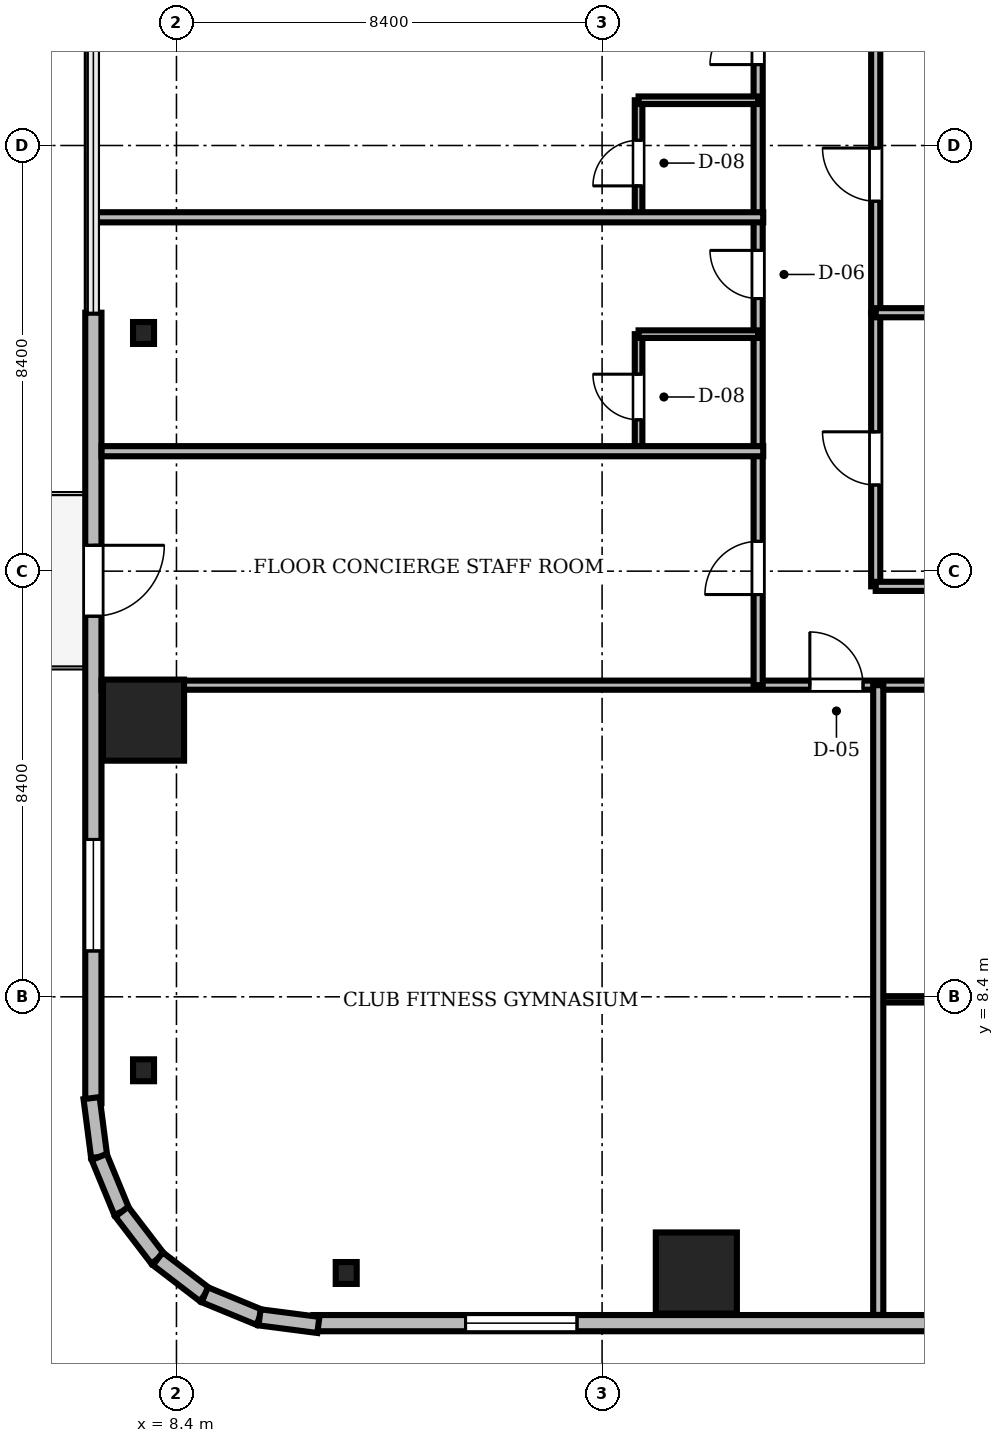
"""IFC4 building model, lengths in metres.
Left out: names, types, materials, properties, quantities, classifications, styles, units other than length and angle.
Written with IfcOpenShell. Run it as: python <this file> out.ifc"""

import sys

from ifc_helpers import new_model, si_unit, direction, frame, frame_2d, origin, origin_2d, place, context, subcontext, project, spatial, rectangle, i_section, extrude, source, transform, mapped, element, fill, save


model = new_model("IFC4")
c1 = context("Model", 3, precision=1e-05, world=origin(), true_north=direction((0.0, 1.0)))
c2 = subcontext(c1, "Body", "Model", "MODEL_VIEW")
j1 = project(units=[si_unit("LENGTHUNIT", "METRE"), si_unit("PLANEANGLEUNIT", "RADIAN")], contexts=[c1])
p1 = place(None, origin())
s1 = spatial("IfcSite", under=j1, at=p1, CompositionType="ELEMENT")
p2 = place(p1, origin())
s2 = spatial("IfcBuilding", under=s1, at=p2, CompositionType="ELEMENT")
p3 = place(p2, frame((0.0, 0.0, 144.6)))
s3 = spatial("IfcBuildingStorey", under=s2, at=p3, CompositionType="ELEMENT", Elevation=144.6)
m1 = source(origin(), c2, "Body", "SweptSolid", [
    extrude(rectangle(XDim=1.6, YDim=1.6, at=origin_2d()), origin(), (0.0, 0.0, 1.0), 3.46),
])
for number, where, z_axis, x_axis in (
    (1, (18.66, 2.95, 0.0), (0.0, 0.0, 1.0), (1.0, 0.0, 0.0)),
    (2, (7.75, 13.86, 0.0), (0.0, 0.0, 1.0), (1.0, 0.0, 0.0)),
):
    element("IfcColumn", number, at=place(p3, frame(where, z_axis=z_axis, x_axis=x_axis)), inside=s3, PredefinedType="COLUMN", context=c2, shape_type="MappedRepresentation", body=[
        mapped(m1, transform((0.0, 0.0, 0.0), scale=1.0)),
    ])
m2 = source(origin(), c2, "Body", "SweptSolid", [
    extrude(i_section(OverallWidth=0.414, OverallDepth=0.432, WebThickness=0.026, FlangeThickness=0.04, FilletRadius=0.015, at=origin_2d()), origin(), (0.0, 0.0, 1.0), 3.46),
])
for number, where, z_axis, x_axis in (
    (3, (11.75, 2.95, 0.0), (0.0, 0.0, 1.0), (1.0, 0.0, 0.0)),
    (4, (7.75, 21.5, 0.0), (0.0, 0.0, 1.0), (1.0, 0.0, 0.0)),
    (5, (7.75, 6.95, 0.0), (0.0, 0.0, 1.0), (1.0, 0.0, 0.0)),
):
    element("IfcColumn", number, at=place(p3, frame(where, z_axis=z_axis, x_axis=x_axis)), inside=s3, PredefinedType="COLUMN", context=c2, shape_type="MappedRepresentation", body=[
        mapped(m2, transform((0.0, 0.0, 0.0), scale=1.0)),
    ])
m3 = source(origin(), c2, "Body", "SweptSolid", [
    extrude(rectangle(XDim=15.6, YDim=0.32, at=frame_2d((7.8, 0.0))), origin(), (0.0, 0.0, 1.0), 3.46),
])
p4 = place(p3, frame((11.1, 1.96, 0.0), z_axis=(0.0, 0.0, 1.0), x_axis=(1.0, 0.0, 0.0)))
e6 = element("IfcWall", 6, at=p4, inside=s3, PredefinedType="SOLIDWALL", context=c2, shape_type="MappedRepresentation", body=[
    mapped(m3, transform((0.0, 0.0, 0.0), scale=1.0)),
])
m4 = source(origin(), c2, "Body", "SweptSolid", [
    extrude(rectangle(XDim=2.2, YDim=2.4, at=frame_2d((1.1, 1.2))), frame((0.0, 0.17, 0.0), z_axis=(0.0, -1.0, 0.0), x_axis=(1.0, 0.0, 0.0)), (0.0, 0.0, 1.0), 0.34),
])
p5 = place(p4, frame((3.005, 0.0, 0.72)))
e7 = element("IfcOpeningElement", 7, at=p5, cuts=e6, PredefinedType="OPENING", context=c2, shape_type="MappedRepresentation", body=[
    mapped(m4, transform((0.0, 0.0, 0.0), scale=1.0)),
])
p6 = place(p3, frame((6.76, 21.9, 0.0), z_axis=(0.0, 0.0, 1.0), x_axis=(0.0, -1.0, 0.0)))
e8 = element("IfcWall", 8, at=p6, inside=s3, PredefinedType="SOLIDWALL", context=c2, shape_type="MappedRepresentation", body=[
    mapped(m3, transform((0.0, 0.0, 0.0), scale=1.0)),
])
m5 = source(origin(), c2, "Body", "SweptSolid", [
    extrude(rectangle(XDim=1.4, YDim=2.3, at=frame_2d((0.7, 1.15))), frame((0.0, 0.17, 0.0), z_axis=(0.0, -1.0, 0.0), x_axis=(1.0, 0.0, 0.0)), (0.0, 0.0, 1.0), 0.34),
])
p7 = place(p6, frame((4.59, 0.0, 0.0)))
e9 = element("IfcOpeningElement", 9, at=p7, cuts=e8, PredefinedType="OPENING", context=c2, shape_type="MappedRepresentation", body=[
    mapped(m5, transform((0.0, 0.0, 0.0), scale=1.0)),
])
p8 = place(p6, frame((10.395, 0.0, 0.72)))
e10 = element("IfcOpeningElement", 10, at=p8, cuts=e8, PredefinedType="OPENING", context=c2, shape_type="MappedRepresentation", body=[
    mapped(m4, transform((0.0, 0.0, 0.0), scale=1.0)),
])
m6 = source(origin(), c2, "Body", "SweptSolid", [
    extrude(rectangle(XDim=1.171, YDim=0.32, at=frame_2d((0.585, 0.0))), origin(), (0.0, 0.0, 1.0), 3.46),
])
p9 = place(p3, frame((6.724, 6.401, 0.0), z_axis=(0.0, 0.0, 1.0), x_axis=(0.128269133229, -0.991739395941, 0.0)))
e11 = element("IfcWall", 11, at=p9, inside=s3, PredefinedType="SOLIDWALL", context=c2, shape_type="MappedRepresentation", body=[
    mapped(m6, transform((0.0, 0.0, 0.0), scale=1.0)),
])
m7 = source(origin(), c2, "Body", "SweptSolid", [
    extrude(rectangle(XDim=1.169, YDim=0.32, at=frame_2d((0.584, 0.0))), origin(), (0.0, 0.0, 1.0), 3.46),
])
for number, where, z_axis, x_axis in (
    (12, (6.875, 5.24, 0.0), (0.0, 0.0, 1.0), (0.381, -0.925, 0.0)),
    (13, (7.32, 4.159, 0.0), (0.0, 0.0, 1.0), (0.608, -0.794, 0.0)),
):
    element("IfcWall", number, at=place(p3, frame(where, z_axis=z_axis, x_axis=x_axis)), inside=s3, PredefinedType="SOLIDWALL", context=c2, shape_type="MappedRepresentation", body=[
        mapped(m7, transform((0.0, 0.0, 0.0), scale=1.0)),
    ])
m8 = source(origin(), c2, "Body", "SweptSolid", [
    extrude(rectangle(XDim=1.169, YDim=0.32, at=frame_2d((0.584, 0.0))), origin(), (0.0, 0.0, 1.0), 3.46),
])
p10 = place(p3, frame((8.031, 3.231, 0.0), z_axis=(0.0, 0.0, 1.0), x_axis=(0.793663520347, -0.608356981114, 0.0)))
e14 = element("IfcWall", 14, at=p10, inside=s3, PredefinedType="SOLIDWALL", context=c2, shape_type="MappedRepresentation", body=[
    mapped(m8, transform((0.0, 0.0, 0.0), scale=1.0)),
])
m9 = source(origin(), c2, "Body", "SweptSolid", [
    extrude(rectangle(XDim=1.169, YDim=0.32, at=frame_2d((0.585, 0.0))), origin(), (0.0, 0.0, 1.0), 3.46),
])
p11 = place(p3, frame((8.959, 2.52, 0.0), z_axis=(0.0, 0.0, 1.0), x_axis=(0.924479075121, -0.381232789334, 0.0)))
e15 = element("IfcWall", 15, at=p11, inside=s3, PredefinedType="SOLIDWALL", context=c2, shape_type="MappedRepresentation", body=[
    mapped(m9, transform((0.0, 0.0, 0.0), scale=1.0)),
])
m10 = source(origin(), c2, "Body", "SweptSolid", [
    extrude(rectangle(XDim=1.17, YDim=0.32, at=frame_2d((0.585, 0.0))), origin(), (0.0, 0.0, 1.0), 3.46),
])
p12 = place(p3, frame((10.04, 2.074, 0.0), z_axis=(0.0, 0.0, 1.0), x_axis=(0.991762485493, -0.128090485085, 0.0)))
e16 = element("IfcWall", 16, at=p12, inside=s3, PredefinedType="SOLIDWALL", context=c2, shape_type="MappedRepresentation", body=[
    mapped(m10, transform((0.0, 0.0, 0.0), scale=1.0)),
])
m11 = source(origin(), c2, "Body", "SweptSolid", [
    extrude(rectangle(XDim=46.156, YDim=0.18, at=frame_2d((23.078, 0.0))), origin(), (0.0, 0.0, 1.0), 2.702),
])
p13 = place(p3, frame((6.922, 14.55, 0.0), z_axis=(0.0, 0.0, 1.0), x_axis=(1.0, 0.0, 0.0)))
e17 = element("IfcWall", 17, at=p13, inside=s3, PredefinedType="PARTITIONING", context=c2, shape_type="MappedRepresentation", body=[
    mapped(m11, transform((0.0, 0.0, 0.0), scale=1.0)),
])
m12 = source(origin(), c2, "Body", "SweptSolid", [
    extrude(rectangle(XDim=1.05, YDim=2.2, at=frame_2d((0.525, 1.1))), frame((0.0, 0.1, 0.0), z_axis=(0.0, -1.0, 0.0), x_axis=(1.0, 0.0, 0.0)), (0.0, 0.0, 1.0), 0.2),
])
p14 = place(p13, frame((13.978, 0.0, 0.0)))
e18 = element("IfcOpeningElement", 18, at=p14, cuts=e17, PredefinedType="OPENING", context=c2, shape_type="MappedRepresentation", body=[
    mapped(m12, transform((0.0, 0.0, 0.0), scale=1.0)),
])
p15 = place(p13, frame((17.698, 0.0, 0.0)))
e19 = element("IfcOpeningElement", 19, at=p15, cuts=e17, PredefinedType="OPENING", context=c2, shape_type="MappedRepresentation", body=[
    mapped(m12, transform((0.0, 0.0, 0.0), scale=1.0)),
])
p16 = place(p13, frame((23.477, 0.0, 0.0)))
e20 = element("IfcOpeningElement", 20, at=p16, cuts=e17, PredefinedType="OPENING", context=c2, shape_type="MappedRepresentation", body=[
    mapped(m12, transform((0.0, 0.0, 0.0), scale=1.0)),
])
p17 = place(p13, frame((29.357, 0.0, 0.0)))
e21 = element("IfcOpeningElement", 21, at=p17, cuts=e17, PredefinedType="OPENING", context=c2, shape_type="MappedRepresentation", body=[
    mapped(m12, transform((0.0, 0.0, 0.0), scale=1.0)),
])
p18 = place(p13, frame((35.136, 0.0, 0.0)))
e22 = element("IfcOpeningElement", 22, at=p18, cuts=e17, PredefinedType="OPENING", context=c2, shape_type="MappedRepresentation", body=[
    mapped(m12, transform((0.0, 0.0, 0.0), scale=1.0)),
])
p19 = place(p13, frame((41.766, 0.0, 0.0)))
e23 = element("IfcOpeningElement", 23, at=p19, cuts=e17, PredefinedType="OPENING", context=c2, shape_type="MappedRepresentation", body=[
    mapped(m12, transform((0.0, 0.0, 0.0), scale=1.0)),
])
m13 = source(origin(), c2, "Body", "SweptSolid", [
    extrude(rectangle(XDim=14.0, YDim=0.18, at=frame_2d((7.0, 0.0))), origin(), (0.0, 0.0, 1.0), 2.852),
])
p20 = place(p3, frame((19.88, 14.55, 0.0), z_axis=(0.0, 0.0, 1.0), x_axis=(0.0, 1.0, 0.0)))
e24 = element("IfcWall", 24, at=p20, inside=s3, PredefinedType="PARTITIONING", context=c2, shape_type="MappedRepresentation", body=[
    mapped(m13, transform((0.0, 0.0, 0.0), scale=1.0)),
])
p21 = place(p20, frame((1.788, 0.0, 0.0)))
e25 = element("IfcOpeningElement", 25, at=p21, cuts=e24, PredefinedType="OPENING", context=c2, shape_type="MappedRepresentation", body=[
    mapped(m12, transform((0.0, 0.0, 0.0), scale=1.0)),
])
m14 = source(origin(), c2, "Body", "SweptSolid", [
    extrude(rectangle(XDim=0.95, YDim=2.15, at=frame_2d((0.475, 1.075))), frame((0.0, 0.1, 0.0), z_axis=(0.0, -1.0, 0.0), x_axis=(1.0, 0.0, 0.0)), (0.0, 0.0, 1.0), 0.2),
])
p22 = place(p20, frame((7.63, 0.0, 0.0)))
e26 = element("IfcOpeningElement", 26, at=p22, cuts=e24, PredefinedType="OPENING", context=c2, shape_type="MappedRepresentation", body=[
    mapped(m14, transform((0.0, 0.0, 0.0), scale=1.0)),
])
p23 = place(p20, frame((12.247, 0.0, 0.0)))
e27 = element("IfcOpeningElement", 27, at=p23, cuts=e24, PredefinedType="OPENING", context=c2, shape_type="MappedRepresentation", body=[
    mapped(m14, transform((0.0, 0.0, 0.0), scale=1.0)),
])
m15 = source(origin(), c2, "Body", "SweptSolid", [
    extrude(rectangle(XDim=6.54, YDim=0.18, at=frame_2d((3.27, 0.0))), origin(), (0.0, 0.0, 1.0), 2.852),
])
p24 = place(p3, frame((22.2, 21.9, 0.0), z_axis=(0.0, 0.0, 1.0), x_axis=(0.0, 1.0, 0.0)))
e28 = element("IfcWall", 28, at=p24, inside=s3, PredefinedType="PARTITIONING", context=c2, shape_type="MappedRepresentation", body=[
    mapped(m15, transform((0.0, 0.0, 0.0), scale=1.0)),
])
p25 = place(p24, frame((2.2, 0.0, 0.0)))
e29 = element("IfcOpeningElement", 29, at=p25, cuts=e28, PredefinedType="OPENING", context=c2, shape_type="MappedRepresentation", body=[
    mapped(m12, transform((0.0, 0.0, 0.0), scale=1.0)),
])
m16 = source(origin(), c2, "Body", "SweptSolid", [
    extrude(rectangle(XDim=5.779, YDim=0.125, at=frame_2d((2.89, 0.0))), origin(), (0.0, 0.0, 1.0), 2.852),
])
p26 = place(p3, frame((22.25, 8.35, 0.0), z_axis=(0.0, 0.0, 1.0), x_axis=(1.0, 0.0, 0.0)))
e30 = element("IfcWall", 30, at=p26, inside=s3, PredefinedType="PARTITIONING", context=c2, shape_type="MappedRepresentation", body=[
    mapped(m16, transform((0.0, 0.0, 0.0), scale=1.0)),
])
m17 = source(origin(), c2, "Body", "SweptSolid", [
    extrude(rectangle(XDim=0.95, YDim=2.15, at=frame_2d((0.475, 1.075))), frame((0.0, 0.073, 0.0), z_axis=(0.0, -1.0, 0.0), x_axis=(1.0, 0.0, 0.0)), (0.0, 0.0, 1.0), 0.145),
])
p27 = place(p26, frame((2.41, 0.0, 0.0)))
e31 = element("IfcOpeningElement", 31, at=p27, cuts=e30, PredefinedType="OPENING", context=c2, shape_type="MappedRepresentation", body=[
    mapped(m17, transform((0.0, 0.0, 0.0), scale=1.0)),
])
m18 = source(origin(), c2, "Body", "SweptSolid", [
    extrude(rectangle(XDim=5.4, YDim=0.18, at=frame_2d((2.7, 0.0))), origin(), (0.0, 0.0, 1.0), 2.852),
])
p28 = place(p3, frame((22.2, 16.5, 0.0), z_axis=(0.0, 0.0, 1.0), x_axis=(0.0, 1.0, 0.0)))
e32 = element("IfcWall", 32, at=p28, inside=s3, PredefinedType="PARTITIONING", context=c2, shape_type="MappedRepresentation", body=[
    mapped(m18, transform((0.0, 0.0, 0.0), scale=1.0)),
])
p29 = place(p28, frame((2.0, 0.0, 0.0)))
e33 = element("IfcOpeningElement", 33, at=p29, cuts=e32, PredefinedType="OPENING", context=c2, shape_type="MappedRepresentation", body=[
    mapped(m12, transform((0.0, 0.0, 0.0), scale=1.0)),
])
m19 = source(origin(), c2, "Body", "SweptSolid", [
    extrude(rectangle(XDim=2.29, YDim=0.15, at=frame_2d((1.145, 0.0))), origin(), (0.0, 0.0, 1.0), 2.852),
])
p30 = place(p3, frame((17.52, 19.187, 0.0), z_axis=(0.0, 0.0, 1.0), x_axis=(0.0, 1.0, 0.0)))
e34 = element("IfcWall", 34, at=p30, inside=s3, PredefinedType="PARTITIONING", context=c2, shape_type="MappedRepresentation", body=[
    mapped(m19, transform((0.0, 0.0, 0.0), scale=1.0)),
])
m20 = source(origin(), c2, "Body", "SweptSolid", [
    extrude(rectangle(XDim=0.9, YDim=2.1, at=frame_2d((0.45, 1.05))), frame((0.0, 0.085, 0.0), z_axis=(0.0, -1.0, 0.0), x_axis=(1.0, 0.0, 0.0)), (0.0, 0.0, 1.0), 0.17),
])
p31 = place(p30, frame((0.6, 0.0, 0.0)))
e35 = element("IfcOpeningElement", 35, at=p31, cuts=e34, PredefinedType="OPENING", context=c2, shape_type="MappedRepresentation", body=[
    mapped(m20, transform((0.0, 0.0, 0.0), scale=1.0)),
])
m21 = source(origin(), c2, "Body", "SweptSolid", [
    extrude(rectangle(XDim=2.29, YDim=0.15, at=frame_2d((1.145, 0.0))), origin(), (0.0, 0.0, 1.0), 3.46),
])
p32 = place(p3, frame((17.52, 23.803, 0.0), z_axis=(0.0, 0.0, 1.0), x_axis=(0.0, 1.0, 0.0)))
e36 = element("IfcWall", 36, at=p32, inside=s3, PredefinedType="PARTITIONING", context=c2, shape_type="MappedRepresentation", body=[
    mapped(m21, transform((0.0, 0.0, 0.0), scale=1.0)),
])
p33 = place(p32, frame((0.6, 0.0, 0.0)))
e37 = element("IfcOpeningElement", 37, at=p33, cuts=e36, PredefinedType="OPENING", context=c2, shape_type="MappedRepresentation", body=[
    mapped(m20, transform((0.0, 0.0, 0.0), scale=1.0)),
])
m22 = source(origin(), c2, "Body", "SweptSolid", [
    extrude(rectangle(XDim=13.058, YDim=0.2, at=frame_2d((6.529, 0.0))), origin(), (0.0, 0.0, 1.0), 2.702),
])
p34 = place(p3, frame((6.922, 19.167, 0.0), z_axis=(0.0, 0.0, 1.0), x_axis=(1.0, 0.0, 0.0)))
e38 = element("IfcWall", 38, at=p34, inside=s3, PredefinedType="PARTITIONING", context=c2, shape_type="MappedRepresentation", body=[
    mapped(m22, transform((0.0, 0.0, 0.0), scale=1.0)),
])
m23 = source(origin(), c2, "Body", "SweptSolid", [
    extrude(rectangle(XDim=13.25, YDim=0.2, at=frame_2d((6.625, 0.0))), origin(), (0.0, 0.0, 1.0), 2.702),
])
p35 = place(p3, frame((6.73, 23.783, 0.0), z_axis=(0.0, 0.0, 1.0), x_axis=(1.0, 0.0, 0.0)))
e39 = element("IfcWall", 39, at=p35, inside=s3, PredefinedType="PARTITIONING", context=c2, shape_type="MappedRepresentation", body=[
    mapped(m23, transform((0.0, 0.0, 0.0), scale=1.0)),
])
m24 = source(origin(), c2, "Body", "SweptSolid", [
    extrude(rectangle(XDim=12.428, YDim=0.2, at=frame_2d((6.214, 0.0))), origin(), (0.0, 0.0, 1.0), 2.702),
])
p36 = place(p3, frame((22.25, 2.122, 0.0), z_axis=(0.0, 0.0, 1.0), x_axis=(0.0, 1.0, 0.0)))
e40 = element("IfcWall", 40, at=p36, inside=s3, PredefinedType="PARTITIONING", context=c2, shape_type="MappedRepresentation", body=[
    mapped(m24, transform((0.0, 0.0, 0.0), scale=1.0)),
])
m25 = source(origin(), c2, "Body", "SweptSolid", [
    extrude(rectangle(XDim=6.2, YDim=0.18, at=frame_2d((3.1, 0.0))), origin(), (0.0, 0.0, 1.0), 3.46),
])
for number, where, z_axis, x_axis in (
    (41, (22.2, 16.5, 0.0), (0.0, 0.0, 1.0), (1.0, 0.0, 0.0)),
    (42, (22.2, 21.9, 0.0), (0.0, 0.0, 1.0), (1.0, 0.0, 0.0)),
):
    element("IfcWall", number, at=place(p3, frame(where, z_axis=z_axis, x_axis=x_axis)), inside=s3, PredefinedType="PARTITIONING", context=c2, shape_type="MappedRepresentation", body=[
        mapped(m25, transform((0.0, 0.0, 0.0), scale=1.0)),
    ])
m26 = source(origin(), c2, "Body", "SweptSolid", [
    extrude(rectangle(XDim=2.36, YDim=0.15, at=frame_2d((1.18, 0.0))), origin(), (0.0, 0.0, 1.0), 3.46),
])
for number, where, z_axis, x_axis in (
    (43, (17.52, 21.477, 0.0), (0.0, 0.0, 1.0), (1.0, 0.0, 0.0)),
    (44, (17.52, 26.093, 0.0), (0.0, 0.0, 1.0), (1.0, 0.0, 0.0)),
):
    element("IfcWall", number, at=place(p3, frame(where, z_axis=z_axis, x_axis=x_axis)), inside=s3, PredefinedType="PARTITIONING", context=c2, shape_type="MappedRepresentation", body=[
        mapped(m26, transform((0.0, 0.0, 0.0), scale=1.0)),
    ])
m27 = source(origin(), c2, "Body", "SweptSolid", [
    extrude(rectangle(XDim=2.2, YDim=2.4, at=frame_2d((1.1, 1.2))), frame((0.0, 0.03, 0.0), z_axis=(0.0, -1.0, 0.0), x_axis=(1.0, 0.0, 0.0)), (0.0, 0.0, 1.0), 0.06),
])
p37 = place(p5, origin())
e45 = element("IfcWindow", 45, at=p37, inside=s3, PartitioningType="SINGLE_PANEL", PredefinedType="WINDOW", context=c2, shape_type="MappedRepresentation", body=[
    mapped(m27, transform((0.0, 0.0, 0.0), scale=1.0)),
])
fill(e7, e45)
m28 = source(origin(), c2, "Body", "SweptSolid", [
    extrude(rectangle(XDim=1.4, YDim=2.3, at=frame_2d((0.7, 1.15))), frame((0.0, 0.025, 0.0), z_axis=(0.0, -1.0, 0.0), x_axis=(1.0, 0.0, 0.0)), (0.0, 0.0, 1.0), 0.05),
])
p38 = place(p7, frame((1.4, 0.0, 0.0), z_axis=(0.0, 0.0, 1.0), x_axis=(-1.0, 0.0, 0.0)))
e46 = element("IfcDoor", 46, at=p38, inside=s3, OperationType="DOUBLE_DOOR_SLIDING", PredefinedType="DOOR", context=c2, shape_type="MappedRepresentation", body=[
    mapped(m28, transform((0.0, 0.0, 0.0), scale=1.0)),
])
fill(e9, e46)
p39 = place(p8, origin())
e47 = element("IfcWindow", 47, at=p39, inside=s3, PartitioningType="SINGLE_PANEL", PredefinedType="WINDOW", context=c2, shape_type="MappedRepresentation", body=[
    mapped(m27, transform((0.0, 0.0, 0.0), scale=1.0)),
])
fill(e10, e47)
m29 = source(origin(), c2, "Body", "SweptSolid", [
    extrude(rectangle(XDim=1.05, YDim=2.2, at=frame_2d((0.525, 1.1))), frame((0.0, 0.025, 0.0), z_axis=(0.0, -1.0, 0.0), x_axis=(1.0, 0.0, 0.0)), (0.0, 0.0, 1.0), 0.05),
])
p40 = place(p14, origin())
e48 = element("IfcDoor", 48, at=p40, inside=s3, OperationType="SINGLE_SWING_LEFT", PredefinedType="DOOR", context=c2, shape_type="MappedRepresentation", body=[
    mapped(m29, transform((0.0, 0.0, 0.0), scale=1.0)),
])
fill(e18, e48)
p41 = place(p21, origin())
e49 = element("IfcDoor", 49, at=p41, inside=s3, OperationType="SINGLE_SWING_LEFT", PredefinedType="DOOR", context=c2, shape_type="MappedRepresentation", body=[
    mapped(m29, transform((0.0, 0.0, 0.0), scale=1.0)),
])
fill(e25, e49)
m30 = source(origin(), c2, "Body", "SweptSolid", [
    extrude(rectangle(XDim=0.95, YDim=2.15, at=frame_2d((0.475, 1.075))), frame((0.0, 0.025, 0.0), z_axis=(0.0, -1.0, 0.0), x_axis=(1.0, 0.0, 0.0)), (0.0, 0.0, 1.0), 0.05),
])
p42 = place(p22, origin())
e50 = element("IfcDoor", 50, at=p42, inside=s3, OperationType="SINGLE_SWING_RIGHT", PredefinedType="DOOR", context=c2, shape_type="MappedRepresentation", body=[
    mapped(m30, transform((0.0, 0.0, 0.0), scale=1.0)),
])
fill(e26, e50)
p43 = place(p23, origin())
e51 = element("IfcDoor", 51, at=p43, inside=s3, OperationType="SINGLE_SWING_LEFT", PredefinedType="DOOR", context=c2, shape_type="MappedRepresentation", body=[
    mapped(m30, transform((0.0, 0.0, 0.0), scale=1.0)),
])
fill(e27, e51)
p44 = place(p25, origin())
e52 = element("IfcDoor", 52, at=p44, inside=s3, OperationType="SINGLE_SWING_RIGHT", PredefinedType="DOOR", context=c2, shape_type="MappedRepresentation", body=[
    mapped(m29, transform((0.0, 0.0, 0.0), scale=1.0)),
])
fill(e29, e52)
p45 = place(p29, origin())
e53 = element("IfcDoor", 53, at=p45, inside=s3, OperationType="SINGLE_SWING_RIGHT", PredefinedType="DOOR", context=c2, shape_type="MappedRepresentation", body=[
    mapped(m29, transform((0.0, 0.0, 0.0), scale=1.0)),
])
fill(e33, e53)
m31 = source(origin(), c2, "Body", "SweptSolid", [
    extrude(rectangle(XDim=0.9, YDim=2.1, at=frame_2d((0.45, 1.05))), frame((0.0, 0.025, 0.0), z_axis=(0.0, -1.0, 0.0), x_axis=(1.0, 0.0, 0.0)), (0.0, 0.0, 1.0), 0.05),
])
p46 = place(p31, origin())
e54 = element("IfcDoor", 54, at=p46, inside=s3, OperationType="SINGLE_SWING_RIGHT", PredefinedType="DOOR", context=c2, shape_type="MappedRepresentation", body=[
    mapped(m31, transform((0.0, 0.0, 0.0), scale=1.0)),
])
fill(e35, e54)
p47 = place(p33, origin())
e55 = element("IfcDoor", 55, at=p47, inside=s3, OperationType="SINGLE_SWING_LEFT", PredefinedType="DOOR", context=c2, shape_type="MappedRepresentation", body=[
    mapped(m31, transform((0.0, 0.0, 0.0), scale=1.0)),
])
fill(e37, e55)
save(model, sys.argv[1])
